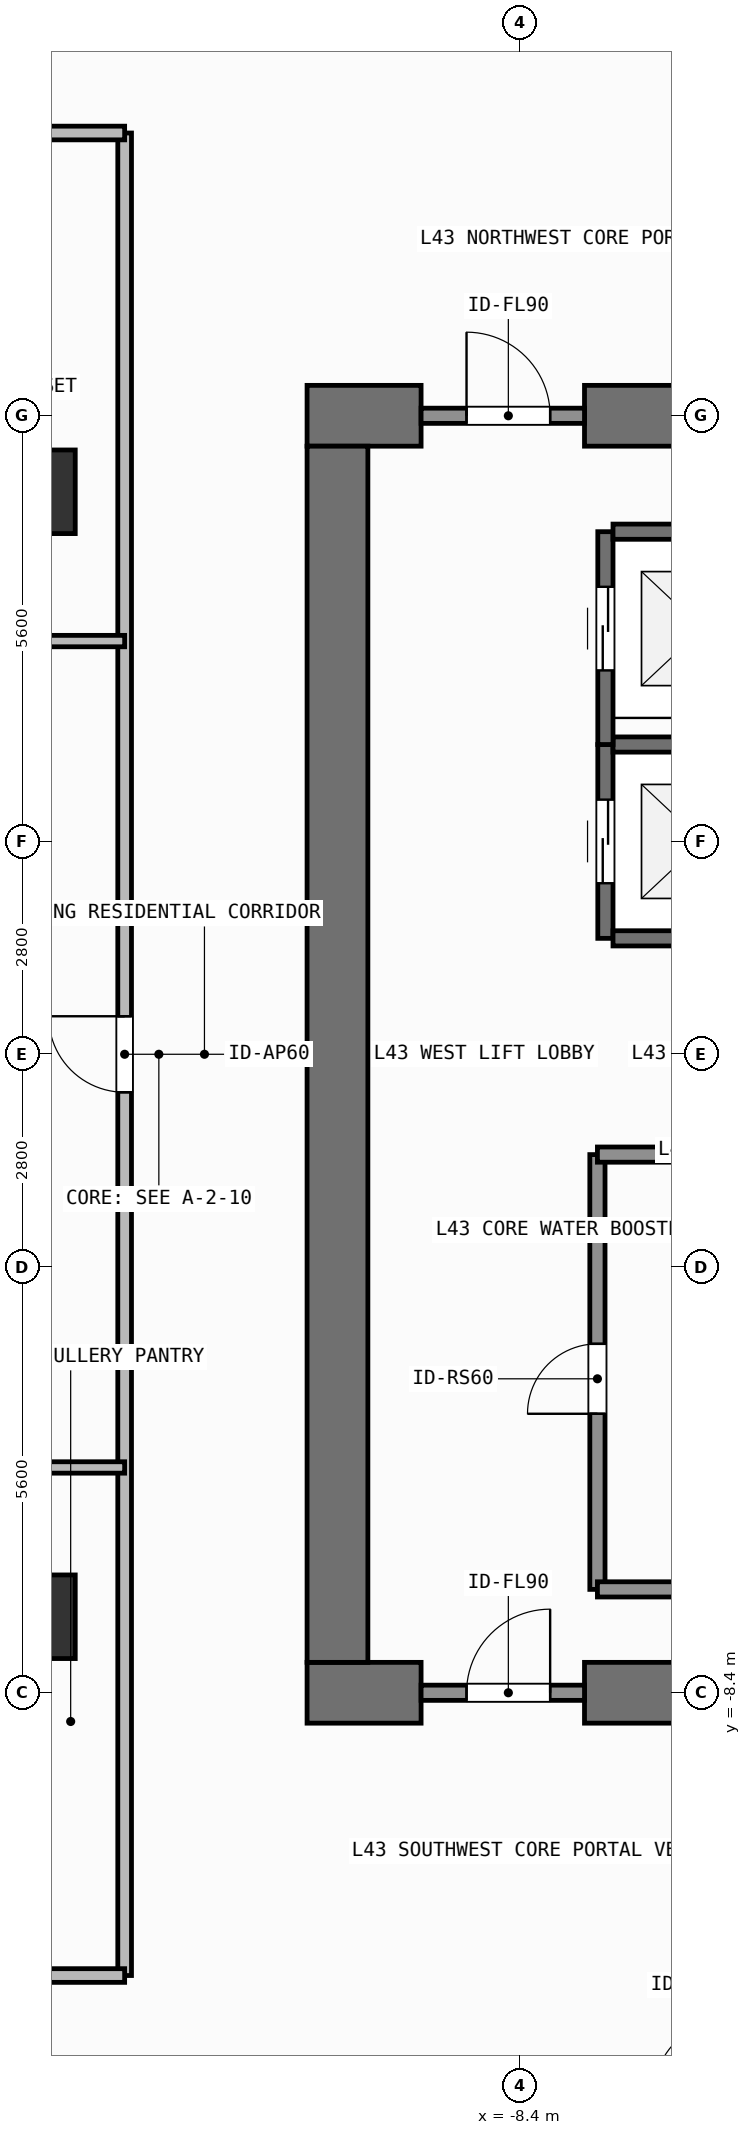
"""IFC4 building model, lengths in metres.
Left out: names, types, materials, properties, quantities, classifications, styles, units other than length and angle.
Written with IfcOpenShell. Run it as: python <this file> out.ifc"""

import sys

from ifc_helpers import new_model, si_unit, direction, frame, frame_2d, origin, origin_2d, place, context, subcontext, project, spatial, rectangle, extrude, element, fill, save


model = new_model("IFC4")
c1 = context("Model", 3, precision=1e-05, world=origin(), true_north=direction((0.0, 1.0)))
c2 = subcontext(c1, "Body", "Model", "MODEL_VIEW")
j1 = project(units=[si_unit("LENGTHUNIT", "METRE"), si_unit("PLANEANGLEUNIT", "RADIAN")], contexts=[c1])
p1 = place(None, origin())
s1 = spatial("IfcSite", under=j1, at=p1, CompositionType="ELEMENT")
p2 = place(p1, origin())
s2 = spatial("IfcBuilding", under=s1, at=p2, CompositionType="ELEMENT")
p3 = place(p2, frame((0.0, 0.0, 175.8)))
s3 = spatial("IfcBuildingStorey", under=s2, at=p3, CompositionType="ELEMENT", Elevation=175.8)
p4 = place(p3, frame((-11.2, -8.4, 0.0), z_axis=(0.0, 0.0, 1.0), x_axis=(1.0, 0.0, 0.0)))
e1 = element("IfcWall", 1, at=p4, inside=s3, PredefinedType="SHEAR", context=c2, shape_type="SweptSolid", body=[
    extrude(rectangle(XDim=1.5, YDim=0.8, at=frame_2d((0.75, 0.0))), origin(), (0.0, 0.0, 1.0), 3.9),
])
p5 = place(p3, frame((-7.55, -8.4, 0.0), z_axis=(0.0, 0.0, 1.0), x_axis=(1.0, 0.0, 0.0)))
e2 = element("IfcWall", 2, at=p5, inside=s3, PredefinedType="SHEAR", context=c2, shape_type="SweptSolid", body=[
    extrude(rectangle(XDim=3.35, YDim=0.8, at=frame_2d((1.675, 0.0))), origin(), (0.0, 0.0, 1.0), 3.9),
])
p6 = place(p3, frame((-11.2, 8.4, 0.0), z_axis=(0.0, 0.0, 1.0), x_axis=(1.0, 0.0, 0.0)))
e3 = element("IfcWall", 3, at=p6, inside=s3, PredefinedType="SHEAR", context=c2, shape_type="SweptSolid", body=[
    extrude(rectangle(XDim=1.5, YDim=0.8, at=frame_2d((0.75, 0.0))), origin(), (0.0, 0.0, 1.0), 3.9),
])
p7 = place(p3, frame((-7.55, 8.4, 0.0), z_axis=(0.0, 0.0, 1.0), x_axis=(1.0, 0.0, 0.0)))
e4 = element("IfcWall", 4, at=p7, inside=s3, PredefinedType="SHEAR", context=c2, shape_type="SweptSolid", body=[
    extrude(rectangle(XDim=16.35, YDim=0.8, at=frame_2d((8.175, 0.0))), origin(), (0.0, 0.0, 1.0), 3.9),
])
p8 = place(p3, frame((-10.8, -8.0, 0.0), z_axis=(0.0, 0.0, 1.0), x_axis=(0.0, 1.0, 0.0)))
e5 = element("IfcWall", 5, at=p8, inside=s3, PredefinedType="SHEAR", context=c2, shape_type="SweptSolid", body=[
    extrude(rectangle(XDim=16.0, YDim=0.8, at=frame_2d((8.0, 0.0))), origin(), (0.0, 0.0, 1.0), 3.9),
])
for number, where, z_axis, x_axis in (
    (6, (-14.8, -7.4, 0.0), (0.0, 0.0, 1.0), (1.0, 0.0, 0.0)),
    (7, (-14.8, 7.4, 0.0), (0.0, 0.0, 1.0), (1.0, 0.0, 0.0)),
):
    element("IfcColumn", number, at=place(p3, frame(where, z_axis=z_axis, x_axis=x_axis)), inside=s3, PredefinedType="COLUMN", context=c2, shape_type="SweptSolid", body=[
        extrude(rectangle(XDim=1.1, YDim=1.1, at=origin_2d()), origin(), (0.0, 0.0, 1.0), 3.9),
    ])
p9 = place(p3, frame((-7.275, 1.525, 0.0), z_axis=(0.0, 0.0, 1.0), x_axis=(0.0, 1.0, 0.0)))
e8 = element("IfcWall", 8, at=p9, inside=s3, PredefinedType="SHEAR", context=c2, shape_type="SweptSolid", body=[
    extrude(rectangle(XDim=2.55, YDim=0.2, at=frame_2d((1.275, 0.0))), origin(), (0.0, 0.0, 1.0), 3.68),
])
p10 = place(p9, frame((0.725, 0.0, 0.0)))
e9 = element("IfcOpeningElement", 9, at=p10, cuts=e8, PredefinedType="OPENING", context=c2, shape_type="SweptSolid", body=[
    extrude(rectangle(XDim=1.1, YDim=2.2, at=frame_2d((0.55, 1.1))), frame((0.0, 0.11, 0.0), z_axis=(0.0, -1.0, 0.0), x_axis=(1.0, 0.0, 0.0)), (0.0, 0.0, 1.0), 0.22),
])
for number, where, z_axis, x_axis in (
    (10, (-7.175, 1.525, 0.0), (0.0, 0.0, 1.0), (1.0, 0.0, 0.0)),
    (11, (-7.175, 4.075, 0.0), (0.0, 0.0, 1.0), (1.0, 0.0, 0.0)),
):
    element("IfcWall", number, at=place(p3, frame(where, z_axis=z_axis, x_axis=x_axis)), inside=s3, PredefinedType="SHEAR", context=c2, shape_type="SweptSolid", body=[
        extrude(rectangle(XDim=2.35, YDim=0.2, at=frame_2d((1.175, 0.0))), origin(), (0.0, 0.0, 1.0), 3.68),
    ])
p11 = place(p3, frame((-7.275, 4.075, 0.0), z_axis=(0.0, 0.0, 1.0), x_axis=(0.0, 1.0, 0.0)))
e12 = element("IfcWall", 12, at=p11, inside=s3, PredefinedType="SHEAR", context=c2, shape_type="SweptSolid", body=[
    extrude(rectangle(XDim=2.8, YDim=0.2, at=frame_2d((1.4, 0.0))), origin(), (0.0, 0.0, 1.0), 3.68),
])
p12 = place(p11, frame((0.975, 0.0, 0.0)))
e13 = element("IfcOpeningElement", 13, at=p12, cuts=e12, PredefinedType="OPENING", context=c2, shape_type="SweptSolid", body=[
    extrude(rectangle(XDim=1.1, YDim=2.2, at=frame_2d((0.55, 1.1))), frame((0.0, 0.11, 0.0), z_axis=(0.0, -1.0, 0.0), x_axis=(1.0, 0.0, 0.0)), (0.0, 0.0, 1.0), 0.22),
])
p13 = place(p3, frame((-7.175, 6.875, 0.0), z_axis=(0.0, 0.0, 1.0), x_axis=(1.0, 0.0, 0.0)))
e14 = element("IfcWall", 14, at=p13, inside=s3, PredefinedType="SHEAR", context=c2, shape_type="SweptSolid", body=[
    extrude(rectangle(XDim=2.35, YDim=0.2, at=frame_2d((1.175, 0.0))), origin(), (0.0, 0.0, 1.0), 3.68),
])
p14 = place(p3, frame((-9.7, -8.4, 0.0), z_axis=(0.0, 0.0, 1.0), x_axis=(1.0, 0.0, 0.0)))
e15 = element("IfcWall", 15, at=p14, inside=s3, PredefinedType="SOLIDWALL", context=c2, shape_type="SweptSolid", body=[
    extrude(rectangle(XDim=2.15, YDim=0.2, at=frame_2d((1.075, 0.0))), origin(), (0.0, 0.0, 1.0), 2.82),
])
p15 = place(p14, frame((0.598, 0.0, 0.0)))
e16 = element("IfcOpeningElement", 16, at=p15, cuts=e15, PredefinedType="OPENING", context=c2, shape_type="SweptSolid", body=[
    extrude(rectangle(XDim=1.1, YDim=2.15, at=frame_2d((0.55, 1.075))), frame((0.0, 0.11, 0.0), z_axis=(0.0, -1.0, 0.0), x_axis=(1.0, 0.0, 0.0)), (0.0, 0.0, 1.0), 0.22),
])
p16 = place(p3, frame((-9.7, 8.4, 0.0), z_axis=(0.0, 0.0, 1.0), x_axis=(1.0, 0.0, 0.0)))
e17 = element("IfcWall", 17, at=p16, inside=s3, PredefinedType="SOLIDWALL", context=c2, shape_type="SweptSolid", body=[
    extrude(rectangle(XDim=2.15, YDim=0.2, at=frame_2d((1.075, 0.0))), origin(), (0.0, 0.0, 1.0), 2.82),
])
p17 = place(p16, frame((0.598, 0.0, 0.0)))
e18 = element("IfcOpeningElement", 18, at=p17, cuts=e17, PredefinedType="OPENING", context=c2, shape_type="SweptSolid", body=[
    extrude(rectangle(XDim=1.1, YDim=2.15, at=frame_2d((0.55, 1.075))), frame((0.0, 0.11, 0.0), z_axis=(0.0, -1.0, 0.0), x_axis=(1.0, 0.0, 0.0)), (0.0, 0.0, 1.0), 0.22),
])
p18 = place(p3, frame((-7.38, -7.04, 0.0), z_axis=(0.0, 0.0, 1.0), x_axis=(0.0, 1.0, 0.0)))
e19 = element("IfcWall", 19, at=p18, inside=s3, PredefinedType="SOLIDWALL", context=c2, shape_type="SweptSolid", body=[
    extrude(rectangle(XDim=5.72, YDim=0.2, at=frame_2d((2.86, 0.0))), origin(), (0.0, 0.0, 1.0), 3.68),
])
p19 = place(p18, frame((2.31, 0.0, 0.0)))
e20 = element("IfcOpeningElement", 20, at=p19, cuts=e19, PredefinedType="OPENING", context=c2, shape_type="SweptSolid", body=[
    extrude(rectangle(XDim=0.92, YDim=2.1, at=frame_2d((0.46, 1.05))), frame((0.0, 0.11, 0.0), z_axis=(0.0, -1.0, 0.0), x_axis=(1.0, 0.0, 0.0)), (0.0, 0.0, 1.0), 0.22),
])
p20 = place(p3, frame((-13.6, -12.12, 0.0), z_axis=(0.0, 0.0, 1.0), x_axis=(0.0, 1.0, 0.0)))
e21 = element("IfcWall", 21, at=p20, inside=s3, PredefinedType="PARTITIONING", context=c2, shape_type="SweptSolid", body=[
    extrude(rectangle(XDim=24.24, YDim=0.18, at=frame_2d((12.12, 0.0))), origin(), (0.0, 0.0, 1.0), 3.68),
])
p21 = place(p20, frame((11.62, 0.0, 0.0)))
e22 = element("IfcOpeningElement", 22, at=p21, cuts=e21, PredefinedType="OPENING", context=c2, shape_type="SweptSolid", body=[
    extrude(rectangle(XDim=1.0, YDim=2.2, at=frame_2d((0.5, 1.1))), frame((0.0, 0.1, 0.0), z_axis=(0.0, -1.0, 0.0), x_axis=(1.0, 0.0, 0.0)), (0.0, 0.0, 1.0), 0.2),
])
p22 = place(p3, frame((-18.223, 5.436, 0.0), z_axis=(0.0, 0.0, 1.0), x_axis=(1.0, 0.0, 0.0)))
e23 = element("IfcWall", 23, at=p22, inside=s3, PredefinedType="PARTITIONING", context=c2, shape_type="SweptSolid", body=[
    extrude(rectangle(XDim=4.623, YDim=0.15, at=frame_2d((2.312, 0.0))), origin(), (0.0, 0.0, 1.0), 3.68),
])
p23 = place(p22, frame((1.886, 0.0, 0.0)))
e24 = element("IfcOpeningElement", 24, at=p23, cuts=e23, PredefinedType="OPENING", context=c2, shape_type="SweptSolid", body=[
    extrude(rectangle(XDim=0.85, YDim=2.1, at=frame_2d((0.425, 1.05))), frame((0.0, 0.085, 0.0), z_axis=(0.0, -1.0, 0.0), x_axis=(1.0, 0.0, 0.0)), (0.0, 0.0, 1.0), 0.17),
])
p24 = place(p3, frame((-21.29, -5.436, 0.0), z_axis=(0.0, 0.0, 1.0), x_axis=(1.0, 0.0, 0.0)))
e25 = element("IfcWall", 25, at=p24, inside=s3, PredefinedType="PARTITIONING", context=c2, shape_type="SweptSolid", body=[
    extrude(rectangle(XDim=7.69, YDim=0.15, at=frame_2d((3.845, 0.0))), origin(), (0.0, 0.0, 1.0), 3.68),
])
p25 = place(p24, frame((3.332, 0.0, 0.0)))
e26 = element("IfcOpeningElement", 26, at=p25, cuts=e25, PredefinedType="OPENING", context=c2, shape_type="SweptSolid", body=[
    extrude(rectangle(XDim=0.85, YDim=2.1, at=frame_2d((0.425, 1.05))), frame((0.0, 0.085, 0.0), z_axis=(0.0, -1.0, 0.0), x_axis=(1.0, 0.0, 0.0)), (0.0, 0.0, 1.0), 0.17),
])
p26 = place(p3, frame((-7.38, -1.32, 0.0), z_axis=(0.0, 0.0, 1.0), x_axis=(1.0, 0.0, 0.0)))
e27 = element("IfcWall", 27, at=p26, inside=s3, PredefinedType="SOLIDWALL", context=c2, shape_type="SweptSolid", body=[
    extrude(rectangle(XDim=2.91, YDim=0.2, at=frame_2d((1.455, 0.0))), origin(), (0.0, 0.0, 1.0), 3.68),
])
p27 = place(p3, frame((-7.38, -7.04, 0.0), z_axis=(0.0, 0.0, 1.0), x_axis=(1.0, 0.0, 0.0)))
e28 = element("IfcWall", 28, at=p27, inside=s3, PredefinedType="SOLIDWALL", context=c2, shape_type="SweptSolid", body=[
    extrude(rectangle(XDim=2.8, YDim=0.2, at=frame_2d((1.4, 0.0))), origin(), (0.0, 0.0, 1.0), 3.68),
])
for number, where, z_axis, x_axis in (
    (29, (-25.53, -12.12, 0.0), (0.0, 0.0, 1.0), (1.0, 0.0, 0.0)),
    (30, (-25.53, 12.12, 0.0), (0.0, 0.0, 1.0), (1.0, 0.0, 0.0)),
):
    element("IfcWall", number, at=place(p3, frame(where, z_axis=z_axis, x_axis=x_axis)), inside=s3, PredefinedType="PARTITIONING", context=c2, shape_type="SweptSolid", body=[
        extrude(rectangle(XDim=11.93, YDim=0.18, at=frame_2d((5.965, 0.0))), origin(), (0.0, 0.0, 1.0), 3.68),
    ])
p28 = place(p10, origin())
e31 = element("IfcDoor", 31, at=p28, inside=s3, OperationType="SLIDING_TO_LEFT", PredefinedType="DOOR", context=c2, shape_type="SweptSolid", body=[
    extrude(rectangle(XDim=1.1, YDim=2.2, at=frame_2d((0.55, 1.1))), frame((0.0, 0.025, 0.0), z_axis=(0.0, -1.0, 0.0), x_axis=(1.0, 0.0, 0.0)), (0.0, 0.0, 1.0), 0.05),
])
fill(e9, e31)
p29 = place(p12, origin())
e32 = element("IfcDoor", 32, at=p29, inside=s3, OperationType="SLIDING_TO_LEFT", PredefinedType="DOOR", context=c2, shape_type="SweptSolid", body=[
    extrude(rectangle(XDim=1.1, YDim=2.2, at=frame_2d((0.55, 1.1))), frame((0.0, 0.025, 0.0), z_axis=(0.0, -1.0, 0.0), x_axis=(1.0, 0.0, 0.0)), (0.0, 0.0, 1.0), 0.05),
])
fill(e13, e32)
p30 = place(p15, origin())
e33 = element("IfcDoor", 33, at=p30, inside=s3, OperationType="SINGLE_SWING_RIGHT", PredefinedType="DOOR", context=c2, shape_type="SweptSolid", body=[
    extrude(rectangle(XDim=1.1, YDim=2.15, at=frame_2d((0.55, 1.075))), frame((0.0, 0.025, 0.0), z_axis=(0.0, -1.0, 0.0), x_axis=(1.0, 0.0, 0.0)), (0.0, 0.0, 1.0), 0.05),
])
fill(e16, e33)
p31 = place(p17, origin())
e34 = element("IfcDoor", 34, at=p31, inside=s3, OperationType="SINGLE_SWING_LEFT", PredefinedType="DOOR", context=c2, shape_type="SweptSolid", body=[
    extrude(rectangle(XDim=1.1, YDim=2.15, at=frame_2d((0.55, 1.075))), frame((0.0, 0.025, 0.0), z_axis=(0.0, -1.0, 0.0), x_axis=(1.0, 0.0, 0.0)), (0.0, 0.0, 1.0), 0.05),
])
fill(e18, e34)
p32 = place(p19, origin())
e35 = element("IfcDoor", 35, at=p32, inside=s3, OperationType="SINGLE_SWING_LEFT", PredefinedType="DOOR", context=c2, shape_type="SweptSolid", body=[
    extrude(rectangle(XDim=0.92, YDim=2.1, at=frame_2d((0.46, 1.05))), frame((0.0, 0.025, 0.0), z_axis=(0.0, -1.0, 0.0), x_axis=(1.0, 0.0, 0.0)), (0.0, 0.0, 1.0), 0.05),
])
fill(e20, e35)
p33 = place(p21, origin())
e36 = element("IfcDoor", 36, at=p33, inside=s3, OperationType="SINGLE_SWING_RIGHT", PredefinedType="DOOR", context=c2, shape_type="SweptSolid", body=[
    extrude(rectangle(XDim=1.0, YDim=2.2, at=frame_2d((0.5, 1.1))), frame((0.0, 0.025, 0.0), z_axis=(0.0, -1.0, 0.0), x_axis=(1.0, 0.0, 0.0)), (0.0, 0.0, 1.0), 0.05),
])
fill(e22, e36)
save(model, sys.argv[1])
